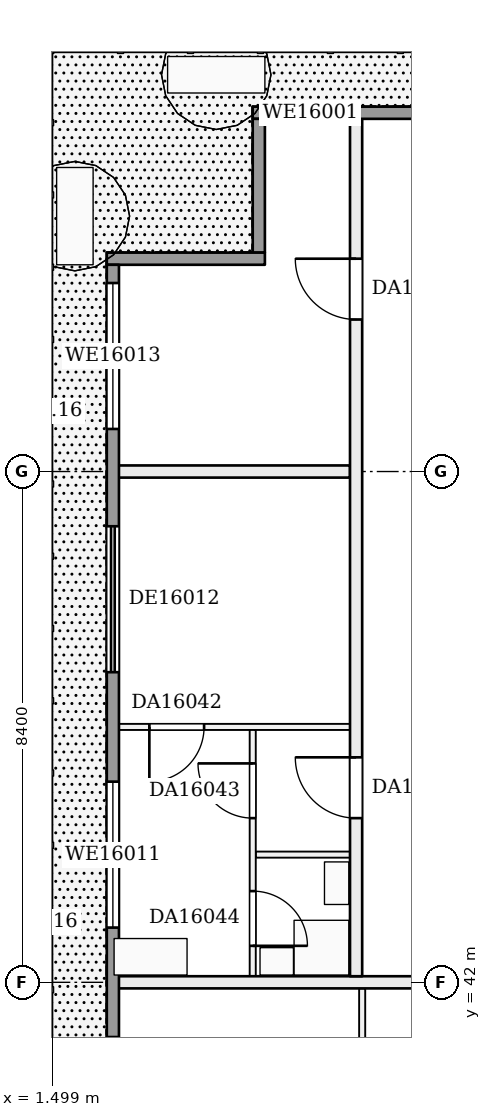
"""IFC4 building model, lengths in metres.
Left out: names, types, materials, properties, quantities, classifications, styles, units other than length and angle.
Written with IfcOpenShell. Run it as: python <this file> out.ifc"""

import sys

from ifc_helpers import new_model, si_unit, direction, frame, frame_2d, origin, place, context, subcontext, project, spatial, rectangle, extrude, element, fill, save


model = new_model("IFC4")
c1 = context("Model", 3, precision=1e-05, world=origin(), true_north=direction((0.0, 1.0)))
c2 = subcontext(c1, "Body", "Model", "MODEL_VIEW")
j1 = project(units=[si_unit("LENGTHUNIT", "METRE"), si_unit("PLANEANGLEUNIT", "RADIAN")], contexts=[c1])
p1 = place(None, origin())
s1 = spatial("IfcSite", under=j1, at=p1, CompositionType="ELEMENT")
p2 = place(p1, origin())
s2 = spatial("IfcBuilding", under=s1, at=p2, CompositionType="ELEMENT")
p3 = place(p2, frame((0.0, 0.0, 67.2)))
s3 = spatial("IfcBuildingStorey", under=s2, at=p3, CompositionType="ELEMENT", Elevation=67.2)
p4 = place(p3, frame((2.5, 42.0, 0.0), z_axis=(0.0, 0.0, 1.0), x_axis=(1.0, 0.0, 0.0)))
e1 = element("IfcWall", 1, at=p4, inside=s3, PredefinedType="PARTITIONING", context=c2, shape_type="SweptSolid", body=[
    extrude(rectangle(XDim=5.9, YDim=0.2, at=frame_2d((2.95, 0.0))), origin(), (0.0, 0.0, 1.0), 3.22),
])
p5 = place(p3, frame((4.85, 44.1, 0.0), z_axis=(0.0, 0.0, 1.0), x_axis=(1.0, 0.0, 0.0)))
e2 = element("IfcWall", 2, at=p5, inside=s3, PredefinedType="PARTITIONING", context=c2, shape_type="SweptSolid", body=[
    extrude(rectangle(XDim=1.55, YDim=0.1, at=frame_2d((0.775, 0.0))), origin(), (0.0, 0.0, 1.0), 3.22),
])
p6 = place(p3, frame((2.5, 46.2, 0.0), z_axis=(0.0, 0.0, 1.0), x_axis=(1.0, 0.0, 0.0)))
e3 = element("IfcWall", 3, at=p6, inside=s3, PredefinedType="PARTITIONING", context=c2, shape_type="SweptSolid", body=[
    extrude(rectangle(XDim=3.9, YDim=0.1, at=frame_2d((1.95, 0.0))), origin(), (0.0, 0.0, 1.0), 3.22),
])
p7 = place(p6, frame((0.6, 0.0, 0.0)))
e4 = element("IfcOpeningElement", 4, at=p7, cuts=e3, PredefinedType="OPENING", context=c2, shape_type="SweptSolid", body=[
    extrude(rectangle(XDim=0.9, YDim=2.1, at=frame_2d((0.45, 1.05))), frame((0.0, 0.06, 0.0), z_axis=(0.0, -1.0, 0.0), x_axis=(1.0, 0.0, 0.0)), (0.0, 0.0, 1.0), 0.12),
])
p8 = place(p3, frame((2.5, 50.4, 0.0), z_axis=(0.0, 0.0, 1.0), x_axis=(1.0, 0.0, 0.0)))
e5 = element("IfcWall", 5, at=p8, inside=s3, PredefinedType="PARTITIONING", context=c2, shape_type="SweptSolid", body=[
    extrude(rectangle(XDim=3.9, YDim=0.2, at=frame_2d((1.95, 0.0))), origin(), (0.0, 0.0, 1.0), 3.22),
])
p9 = place(p3, frame((4.8, 42.1, 0.0), z_axis=(0.0, 0.0, 1.0), x_axis=(0.0, 1.0, 0.0)))
e6 = element("IfcWall", 6, at=p9, inside=s3, PredefinedType="PARTITIONING", context=c2, shape_type="SweptSolid", body=[
    extrude(rectangle(XDim=4.05, YDim=0.1, at=frame_2d((2.025, 0.0))), origin(), (0.0, 0.0, 1.0), 3.22),
])
p10 = place(p9, frame((2.6, 0.0, 0.0)))
e7 = element("IfcOpeningElement", 7, at=p10, cuts=e6, PredefinedType="OPENING", context=c2, shape_type="SweptSolid", body=[
    extrude(rectangle(XDim=0.9, YDim=2.1, at=frame_2d((0.45, 1.05))), frame((0.0, 0.06, 0.0), z_axis=(0.0, -1.0, 0.0), x_axis=(1.0, 0.0, 0.0)), (0.0, 0.0, 1.0), 0.12),
])
p11 = place(p9, frame((0.5, 0.0, 0.0)))
e8 = element("IfcOpeningElement", 8, at=p11, cuts=e6, PredefinedType="OPENING", context=c2, shape_type="SweptSolid", body=[
    extrude(rectangle(XDim=0.9, YDim=2.1, at=frame_2d((0.45, 1.05))), frame((0.0, 0.06, 0.0), z_axis=(0.0, -1.0, 0.0), x_axis=(1.0, 0.0, 0.0)), (0.0, 0.0, 1.0), 0.12),
])
p12 = place(p3, frame((6.5, 42.1, 0.0), z_axis=(0.0, 0.0, 1.0), x_axis=(0.0, 1.0, 0.0)))
e9 = element("IfcWall", 9, at=p12, inside=s3, PredefinedType="PARTITIONING", context=c2, shape_type="SweptSolid", body=[
    extrude(rectangle(XDim=14.2, YDim=0.2, at=frame_2d((7.1, 0.0))), origin(), (0.0, 0.0, 1.0), 3.22),
])
p13 = place(p12, frame((2.6, 0.0, 0.0)))
e10 = element("IfcOpeningElement", 10, at=p13, cuts=e9, PredefinedType="OPENING", context=c2, shape_type="SweptSolid", body=[
    extrude(rectangle(XDim=1.0, YDim=2.1, at=frame_2d((0.5, 1.05))), frame((0.0, 0.11, 0.0), z_axis=(0.0, -1.0, 0.0), x_axis=(1.0, 0.0, 0.0)), (0.0, 0.0, 1.0), 0.22),
])
p14 = place(p12, frame((10.8, 0.0, 0.0)))
e11 = element("IfcOpeningElement", 11, at=p14, cuts=e9, PredefinedType="OPENING", context=c2, shape_type="SweptSolid", body=[
    extrude(rectangle(XDim=1.0, YDim=2.1, at=frame_2d((0.5, 1.05))), frame((0.0, 0.11, 0.0), z_axis=(0.0, -1.0, 0.0), x_axis=(1.0, 0.0, 0.0)), (0.0, 0.0, 1.0), 0.22),
])
p15 = place(p3, frame((6.6, 29.5, 0.0), z_axis=(0.0, 0.0, 1.0), x_axis=(0.0, 1.0, 0.0)))
e12 = element("IfcWall", 12, at=p15, inside=s3, PredefinedType="PARTITIONING", context=c2, shape_type="SweptSolid", body=[
    extrude(rectangle(XDim=12.4, YDim=0.1, at=frame_2d((6.2, 0.0))), origin(), (0.0, 0.0, 1.0), 3.22),
])
p16 = place(p15, frame((1.5, 0.0, 0.0)))
e13 = element("IfcOpeningElement", 13, at=p16, cuts=e12, PredefinedType="OPENING", context=c2, shape_type="SweptSolid", body=[
    extrude(rectangle(XDim=0.9, YDim=2.1, at=frame_2d((0.45, 1.05))), frame((0.0, 0.06, 0.0), z_axis=(0.0, -1.0, 0.0), x_axis=(1.0, 0.0, 0.0)), (0.0, 0.0, 1.0), 0.12),
])
p17 = place(p15, frame((5.7, 0.0, 0.0)))
e14 = element("IfcOpeningElement", 14, at=p17, cuts=e12, PredefinedType="OPENING", context=c2, shape_type="SweptSolid", body=[
    extrude(rectangle(XDim=0.9, YDim=2.1, at=frame_2d((0.45, 1.05))), frame((0.0, 0.06, 0.0), z_axis=(0.0, -1.0, 0.0), x_axis=(1.0, 0.0, 0.0)), (0.0, 0.0, 1.0), 0.12),
])
p18 = place(p15, frame((9.9, 0.0, 0.0)))
e15 = element("IfcOpeningElement", 15, at=p18, cuts=e12, PredefinedType="OPENING", context=c2, shape_type="SweptSolid", body=[
    extrude(rectangle(XDim=0.9, YDim=2.1, at=frame_2d((0.45, 1.05))), frame((0.0, 0.06, 0.0), z_axis=(0.0, -1.0, 0.0), x_axis=(1.0, 0.0, 0.0)), (0.0, 0.0, 1.0), 0.12),
])
p19 = place(p3, frame((8.4, 56.3, 0.0), z_axis=(0.0, 0.0, 1.0), x_axis=(-1.0, 0.0, 0.0)))
e16 = element("IfcWall", 16, at=p19, inside=s3, PredefinedType="SOLIDWALL", context=c2, shape_type="SweptSolid", body=[
    extrude(rectangle(XDim=3.6, YDim=0.2, at=frame_2d((1.8, 0.0))), origin(), (0.0, 0.0, 1.0), 3.22),
])
p20 = place(p19, frame((2.0, 0.0, 0.9)))
e17 = element("IfcOpeningElement", 17, at=p20, cuts=e16, PredefinedType="OPENING", context=c2, shape_type="SweptSolid", body=[
    extrude(rectangle(XDim=1.3, YDim=1.5, at=frame_2d((0.65, 0.75))), frame((0.0, 0.11, 0.0), z_axis=(0.0, -1.0, 0.0), x_axis=(1.0, 0.0, 0.0)), (0.0, 0.0, 1.0), 0.22),
])
p21 = place(p3, frame((4.9, 56.2, 0.0), z_axis=(0.0, 0.0, 1.0), x_axis=(0.0, -1.0, 0.0)))
e18 = element("IfcWall", 18, at=p21, inside=s3, PredefinedType="SOLIDWALL", context=c2, shape_type="SweptSolid", body=[
    extrude(rectangle(XDim=2.2, YDim=0.2, at=frame_2d((1.1, 0.0))), origin(), (0.0, 0.0, 1.0), 3.22),
])
p22 = place(p3, frame((5.0, 53.9, 0.0), z_axis=(0.0, 0.0, 1.0), x_axis=(-1.0, 0.0, 0.0)))
e19 = element("IfcWall", 19, at=p22, inside=s3, PredefinedType="SOLIDWALL", context=c2, shape_type="SweptSolid", body=[
    extrude(rectangle(XDim=2.6, YDim=0.2, at=frame_2d((1.3, 0.0))), origin(), (0.0, 0.0, 1.0), 3.22),
])
p23 = place(p3, frame((2.5, 53.8, 0.0), z_axis=(0.0, 0.0, 1.0), x_axis=(0.0, -1.0, 0.0)))
e20 = element("IfcWall", 20, at=p23, inside=s3, PredefinedType="SOLIDWALL", context=c2, shape_type="SweptSolid", body=[
    extrude(rectangle(XDim=48.8, YDim=0.2, at=frame_2d((24.4, 0.0))), origin(), (0.0, 0.0, 1.0), 3.22),
])
p24 = place(p23, frame((46.1, 0.0, 0.0)))
e21 = element("IfcOpeningElement", 21, at=p24, cuts=e20, PredefinedType="OPENING", context=c2, shape_type="SweptSolid", body=[
    extrude(rectangle(XDim=2.4, YDim=2.2, at=frame_2d((1.2, 1.1))), frame((0.0, 0.11, 0.0), z_axis=(0.0, -1.0, 0.0), x_axis=(1.0, 0.0, 0.0)), (0.0, 0.0, 1.0), 0.22),
])
p25 = place(p23, frame((42.1, 0.0, 0.0)))
e22 = element("IfcOpeningElement", 22, at=p25, cuts=e20, PredefinedType="OPENING", context=c2, shape_type="SweptSolid", body=[
    extrude(rectangle(XDim=2.4, YDim=2.2, at=frame_2d((1.2, 1.1))), frame((0.0, 0.11, 0.0), z_axis=(0.0, -1.0, 0.0), x_axis=(1.0, 0.0, 0.0)), (0.0, 0.0, 1.0), 0.22),
])
p26 = place(p23, frame((37.9, 0.0, 0.9)))
e23 = element("IfcOpeningElement", 23, at=p26, cuts=e20, PredefinedType="OPENING", context=c2, shape_type="SweptSolid", body=[
    extrude(rectangle(XDim=2.4, YDim=1.5, at=frame_2d((1.2, 0.75))), frame((0.0, 0.11, 0.0), z_axis=(0.0, -1.0, 0.0), x_axis=(1.0, 0.0, 0.0)), (0.0, 0.0, 1.0), 0.22),
])
p27 = place(p23, frame((33.7, 0.0, 0.0)))
e24 = element("IfcOpeningElement", 24, at=p27, cuts=e20, PredefinedType="OPENING", context=c2, shape_type="SweptSolid", body=[
    extrude(rectangle(XDim=2.4, YDim=2.2, at=frame_2d((1.2, 1.1))), frame((0.0, 0.11, 0.0), z_axis=(0.0, -1.0, 0.0), x_axis=(1.0, 0.0, 0.0)), (0.0, 0.0, 1.0), 0.22),
])
p28 = place(p23, frame((29.5, 0.0, 0.0)))
e25 = element("IfcOpeningElement", 25, at=p28, cuts=e20, PredefinedType="OPENING", context=c2, shape_type="SweptSolid", body=[
    extrude(rectangle(XDim=2.4, YDim=2.2, at=frame_2d((1.2, 1.1))), frame((0.0, 0.11, 0.0), z_axis=(0.0, -1.0, 0.0), x_axis=(1.0, 0.0, 0.0)), (0.0, 0.0, 1.0), 0.22),
])
p29 = place(p23, frame((25.3, 0.0, 0.0)))
e26 = element("IfcOpeningElement", 26, at=p29, cuts=e20, PredefinedType="OPENING", context=c2, shape_type="SweptSolid", body=[
    extrude(rectangle(XDim=2.4, YDim=2.2, at=frame_2d((1.2, 1.1))), frame((0.0, 0.11, 0.0), z_axis=(0.0, -1.0, 0.0), x_axis=(1.0, 0.0, 0.0)), (0.0, 0.0, 1.0), 0.22),
])
p30 = place(p23, frame((21.1, 0.0, 0.9)))
e27 = element("IfcOpeningElement", 27, at=p30, cuts=e20, PredefinedType="OPENING", context=c2, shape_type="SweptSolid", body=[
    extrude(rectangle(XDim=2.4, YDim=1.5, at=frame_2d((1.2, 0.75))), frame((0.0, 0.11, 0.0), z_axis=(0.0, -1.0, 0.0), x_axis=(1.0, 0.0, 0.0)), (0.0, 0.0, 1.0), 0.22),
])
p31 = place(p23, frame((16.9, 0.0, 0.0)))
e28 = element("IfcOpeningElement", 28, at=p31, cuts=e20, PredefinedType="OPENING", context=c2, shape_type="SweptSolid", body=[
    extrude(rectangle(XDim=2.4, YDim=2.2, at=frame_2d((1.2, 1.1))), frame((0.0, 0.11, 0.0), z_axis=(0.0, -1.0, 0.0), x_axis=(1.0, 0.0, 0.0)), (0.0, 0.0, 1.0), 0.22),
])
p32 = place(p23, frame((12.7, 0.0, 0.9)))
e29 = element("IfcOpeningElement", 29, at=p32, cuts=e20, PredefinedType="OPENING", context=c2, shape_type="SweptSolid", body=[
    extrude(rectangle(XDim=2.4, YDim=1.5, at=frame_2d((1.2, 0.75))), frame((0.0, 0.11, 0.0), z_axis=(0.0, -1.0, 0.0), x_axis=(1.0, 0.0, 0.0)), (0.0, 0.0, 1.0), 0.22),
])
p33 = place(p23, frame((8.5, 0.0, 0.9)))
e30 = element("IfcOpeningElement", 30, at=p33, cuts=e20, PredefinedType="OPENING", context=c2, shape_type="SweptSolid", body=[
    extrude(rectangle(XDim=2.4, YDim=1.5, at=frame_2d((1.2, 0.75))), frame((0.0, 0.11, 0.0), z_axis=(0.0, -1.0, 0.0), x_axis=(1.0, 0.0, 0.0)), (0.0, 0.0, 1.0), 0.22),
])
p34 = place(p23, frame((4.3, 0.0, 0.0)))
e31 = element("IfcOpeningElement", 31, at=p34, cuts=e20, PredefinedType="OPENING", context=c2, shape_type="SweptSolid", body=[
    extrude(rectangle(XDim=2.4, YDim=2.2, at=frame_2d((1.2, 1.1))), frame((0.0, 0.11, 0.0), z_axis=(0.0, -1.0, 0.0), x_axis=(1.0, 0.0, 0.0)), (0.0, 0.0, 1.0), 0.22),
])
p35 = place(p23, frame((0.3, 0.0, 0.9)))
e32 = element("IfcOpeningElement", 32, at=p35, cuts=e20, PredefinedType="OPENING", context=c2, shape_type="SweptSolid", body=[
    extrude(rectangle(XDim=2.4, YDim=1.5, at=frame_2d((1.2, 0.75))), frame((0.0, 0.11, 0.0), z_axis=(0.0, -1.0, 0.0), x_axis=(1.0, 0.0, 0.0)), (0.0, 0.0, 1.0), 0.22),
])
p36 = place(p7, frame((0.9, 0.0, 0.0), z_axis=(0.0, 0.0, 1.0), x_axis=(-1.0, 0.0, 0.0)))
e33 = element("IfcDoor", 33, at=p36, inside=s3, OperationType="SINGLE_SWING_RIGHT", PredefinedType="DOOR", context=c2, shape_type="SweptSolid", body=[
    extrude(rectangle(XDim=0.9, YDim=2.1, at=frame_2d((0.45, 1.05))), frame((0.0, 0.025, 0.0), z_axis=(0.0, -1.0, 0.0), x_axis=(1.0, 0.0, 0.0)), (0.0, 0.0, 1.0), 0.05),
])
fill(e4, e33)
p37 = place(p10, origin())
e34 = element("IfcDoor", 34, at=p37, inside=s3, OperationType="SINGLE_SWING_RIGHT", PredefinedType="DOOR", context=c2, shape_type="SweptSolid", body=[
    extrude(rectangle(XDim=0.9, YDim=2.1, at=frame_2d((0.45, 1.05))), frame((0.0, 0.025, 0.0), z_axis=(0.0, -1.0, 0.0), x_axis=(1.0, 0.0, 0.0)), (0.0, 0.0, 1.0), 0.05),
])
fill(e7, e34)
p38 = place(p11, frame((0.9, 0.0, 0.0), z_axis=(0.0, 0.0, 1.0), x_axis=(-1.0, 0.0, 0.0)))
e35 = element("IfcDoor", 35, at=p38, inside=s3, OperationType="SINGLE_SWING_RIGHT", PredefinedType="DOOR", context=c2, shape_type="SweptSolid", body=[
    extrude(rectangle(XDim=0.9, YDim=2.1, at=frame_2d((0.45, 1.05))), frame((0.0, 0.025, 0.0), z_axis=(0.0, -1.0, 0.0), x_axis=(1.0, 0.0, 0.0)), (0.0, 0.0, 1.0), 0.05),
])
fill(e8, e35)
p39 = place(p13, origin())
e36 = element("IfcDoor", 36, at=p39, inside=s3, OperationType="SINGLE_SWING_RIGHT", PredefinedType="DOOR", context=c2, shape_type="SweptSolid", body=[
    extrude(rectangle(XDim=1.0, YDim=2.1, at=frame_2d((0.5, 1.05))), frame((0.0, 0.025, 0.0), z_axis=(0.0, -1.0, 0.0), x_axis=(1.0, 0.0, 0.0)), (0.0, 0.0, 1.0), 0.05),
])
fill(e10, e36)
p40 = place(p14, origin())
e37 = element("IfcDoor", 37, at=p40, inside=s3, OperationType="SINGLE_SWING_RIGHT", PredefinedType="DOOR", context=c2, shape_type="SweptSolid", body=[
    extrude(rectangle(XDim=1.0, YDim=2.1, at=frame_2d((0.5, 1.05))), frame((0.0, 0.025, 0.0), z_axis=(0.0, -1.0, 0.0), x_axis=(1.0, 0.0, 0.0)), (0.0, 0.0, 1.0), 0.05),
])
fill(e11, e37)
p41 = place(p20, origin())
e38 = element("IfcWindow", 38, at=p41, inside=s3, PartitioningType="SINGLE_PANEL", PredefinedType="WINDOW", context=c2, shape_type="SweptSolid", body=[
    extrude(rectangle(XDim=1.3, YDim=1.5, at=frame_2d((0.65, 0.75))), frame((0.0, 0.03, 0.0), z_axis=(0.0, -1.0, 0.0), x_axis=(1.0, 0.0, 0.0)), (0.0, 0.0, 1.0), 0.06),
])
fill(e17, e38)
p42 = place(p33, origin())
e39 = element("IfcWindow", 39, at=p42, inside=s3, PartitioningType="SINGLE_PANEL", PredefinedType="WINDOW", context=c2, shape_type="SweptSolid", body=[
    extrude(rectangle(XDim=2.4, YDim=1.5, at=frame_2d((1.2, 0.75))), frame((0.0, 0.03, 0.0), z_axis=(0.0, -1.0, 0.0), x_axis=(1.0, 0.0, 0.0)), (0.0, 0.0, 1.0), 0.06),
])
fill(e30, e39)
p43 = place(p34, origin())
e40 = element("IfcDoor", 40, at=p43, inside=s3, OperationType="DOUBLE_DOOR_SLIDING", PredefinedType="DOOR", context=c2, shape_type="SweptSolid", body=[
    extrude(rectangle(XDim=2.4, YDim=2.2, at=frame_2d((1.2, 1.1))), frame((0.0, 0.025, 0.0), z_axis=(0.0, -1.0, 0.0), x_axis=(1.0, 0.0, 0.0)), (0.0, 0.0, 1.0), 0.05),
])
fill(e31, e40)
p44 = place(p35, origin())
e41 = element("IfcWindow", 41, at=p44, inside=s3, PartitioningType="SINGLE_PANEL", PredefinedType="WINDOW", context=c2, shape_type="SweptSolid", body=[
    extrude(rectangle(XDim=2.4, YDim=1.5, at=frame_2d((1.2, 0.75))), frame((0.0, 0.03, 0.0), z_axis=(0.0, -1.0, 0.0), x_axis=(1.0, 0.0, 0.0)), (0.0, 0.0, 1.0), 0.06),
])
fill(e32, e41)
save(model, sys.argv[1])
